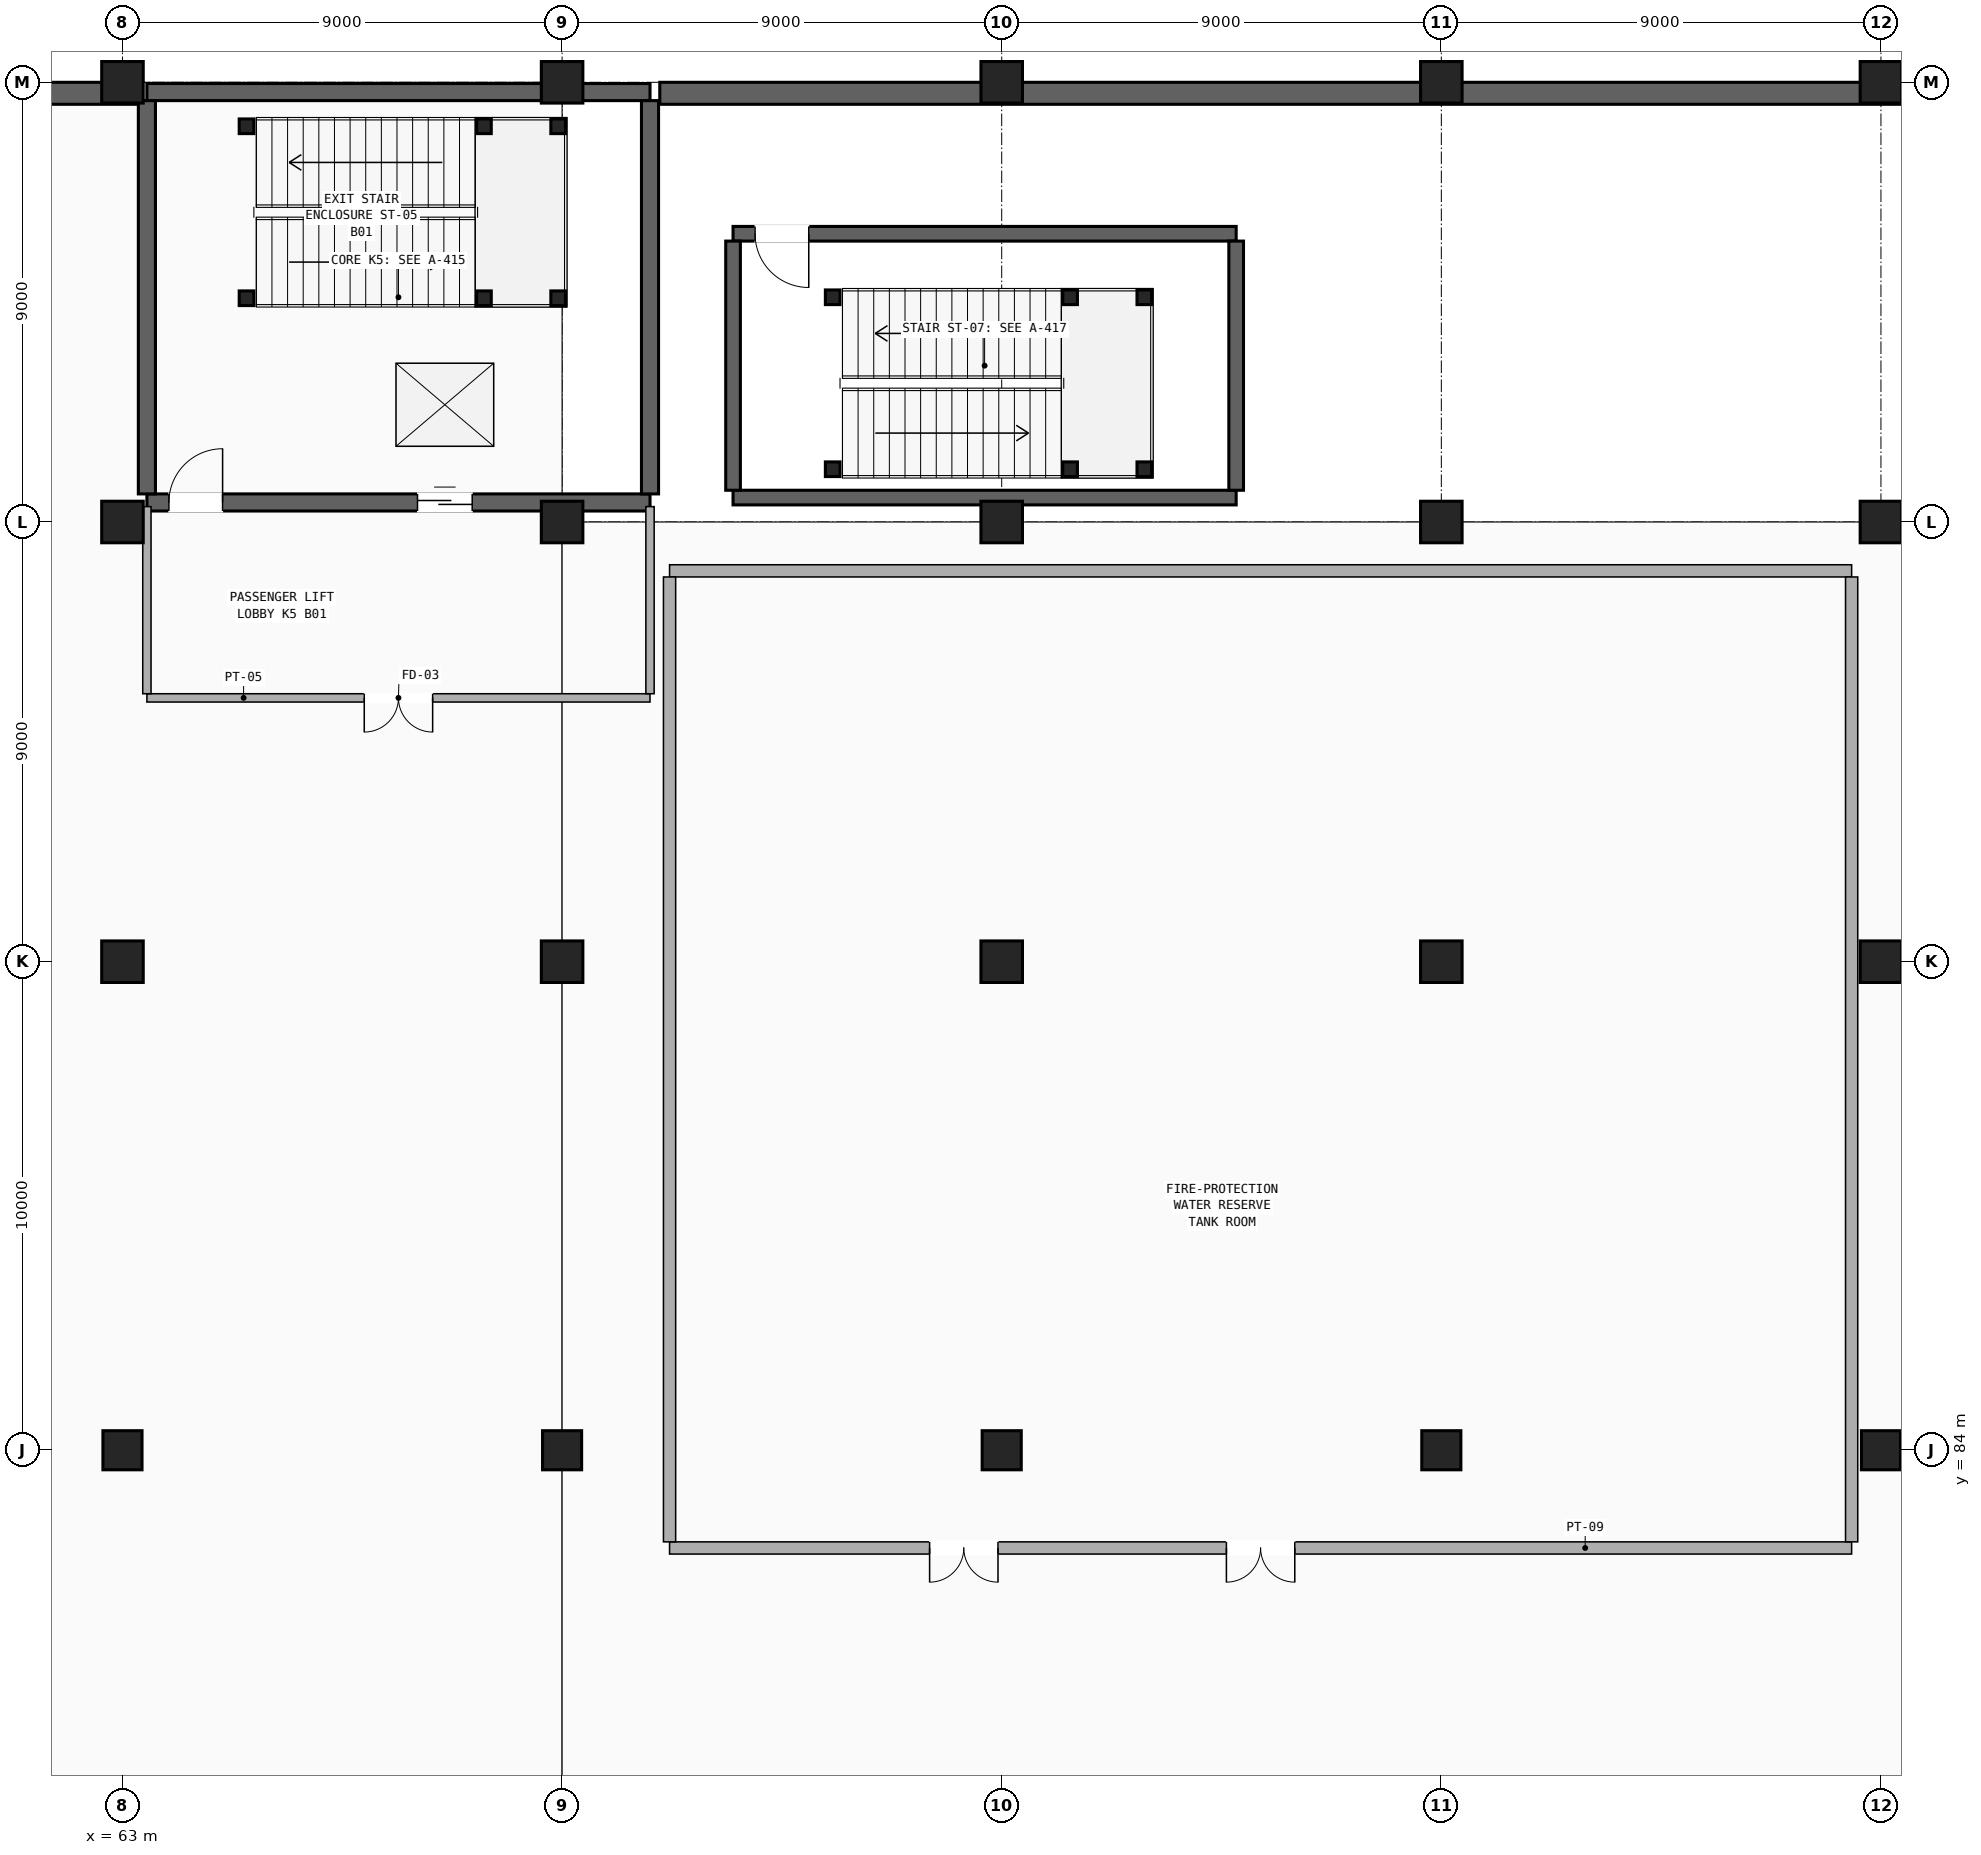
"""IFC4 building model, lengths in metres.
Left out: names, types, materials, properties, quantities, classifications, styles, units other than length and angle.
Written with IfcOpenShell. Run it as: python <this file> out.ifc"""

import sys

from ifc_helpers import new_model, si_unit, direction, frame, frame_2d, origin, origin_2d, place, context, subcontext, project, spatial, rectangle, hollow_rectangle, extrude, element, fill, save


model = new_model("IFC4")
c1 = context("Model", 3, precision=1e-05, world=origin(), true_north=direction((0.0, 1.0)))
c2 = subcontext(c1, "Body", "Model", "MODEL_VIEW")
j1 = project(units=[si_unit("LENGTHUNIT", "METRE"), si_unit("PLANEANGLEUNIT", "RADIAN")], contexts=[c1])
p1 = place(None, origin())
s1 = spatial("IfcSite", under=j1, at=p1, CompositionType="ELEMENT")
p2 = place(p1, origin())
s2 = spatial("IfcBuilding", under=s1, at=p2, CompositionType="ELEMENT")
p3 = place(p2, frame((0.0, 0.0, -5.1)))
s3 = spatial("IfcBuildingStorey", under=s2, at=p3, CompositionType="ELEMENT", Elevation=-5.1)
p4 = place(p3, frame((81.0, 84.0, 0.0), z_axis=(0.0, 0.0, 1.0), x_axis=(1.0, 0.0, 0.0)))
e1 = element("IfcColumn", 1, at=p4, inside=s3, PredefinedType="COLUMN", context=c2, shape_type="SweptSolid", body=[
    extrude(rectangle(XDim=0.8, YDim=0.8, at=origin_2d()), origin(), (0.0, 0.0, 1.0), 5.1),
])
for number, where, z_axis, x_axis in (
    (2, (81.0, 94.0, 0.0), (0.0, 0.0, 1.0), (1.0, 0.0, 0.0)),
    (3, (81.0, 103.0, 0.0), (0.0, 0.0, 1.0), (1.0, 0.0, 0.0)),
    (4, (81.0, 112.0, 0.0), (0.0, 0.0, 1.0), (1.0, 0.0, 0.0)),
):
    element("IfcColumn", number, at=place(p3, frame(where, z_axis=z_axis, x_axis=x_axis)), inside=s3, PredefinedType="COLUMN", context=c2, shape_type="SweptSolid", body=[
        extrude(rectangle(XDim=0.85, YDim=0.85, at=origin_2d()), origin(), (0.0, 0.0, 1.0), 5.1),
    ])
p5 = place(p3, frame((90.0, 84.0, 0.0), z_axis=(0.0, 0.0, 1.0), x_axis=(1.0, 0.0, 0.0)))
e5 = element("IfcColumn", 5, at=p5, inside=s3, PredefinedType="COLUMN", context=c2, shape_type="SweptSolid", body=[
    extrude(rectangle(XDim=0.8, YDim=0.8, at=origin_2d()), origin(), (0.0, 0.0, 1.0), 5.1),
])
for number, where, z_axis, x_axis in (
    (6, (90.0, 94.0, 0.0), (0.0, 0.0, 1.0), (1.0, 0.0, 0.0)),
    (7, (90.0, 103.0, 0.0), (0.0, 0.0, 1.0), (1.0, 0.0, 0.0)),
    (8, (90.0, 112.0, 0.0), (0.0, 0.0, 1.0), (1.0, 0.0, 0.0)),
):
    element("IfcColumn", number, at=place(p3, frame(where, z_axis=z_axis, x_axis=x_axis)), inside=s3, PredefinedType="COLUMN", context=c2, shape_type="SweptSolid", body=[
        extrude(rectangle(XDim=0.85, YDim=0.85, at=origin_2d()), origin(), (0.0, 0.0, 1.0), 5.1),
    ])
p6 = place(p3, frame((99.0, 84.0, 0.0), z_axis=(0.0, 0.0, 1.0), x_axis=(1.0, 0.0, 0.0)))
e9 = element("IfcColumn", 9, at=p6, inside=s3, PredefinedType="COLUMN", context=c2, shape_type="SweptSolid", body=[
    extrude(rectangle(XDim=0.8, YDim=0.8, at=origin_2d()), origin(), (0.0, 0.0, 1.0), 5.1),
])
for number, where, z_axis, x_axis in (
    (10, (99.0, 94.0, 0.0), (0.0, 0.0, 1.0), (1.0, 0.0, 0.0)),
    (11, (99.0, 103.0, 0.0), (0.0, 0.0, 1.0), (1.0, 0.0, 0.0)),
    (12, (99.0, 112.0, 0.0), (0.0, 0.0, 1.0), (1.0, 0.0, 0.0)),
):
    element("IfcColumn", number, at=place(p3, frame(where, z_axis=z_axis, x_axis=x_axis)), inside=s3, PredefinedType="COLUMN", context=c2, shape_type="SweptSolid", body=[
        extrude(rectangle(XDim=0.85, YDim=0.85, at=origin_2d()), origin(), (0.0, 0.0, 1.0), 5.1),
    ])
p7 = place(p3, frame((63.0, 84.0, 0.0), z_axis=(0.0, 0.0, 1.0), x_axis=(1.0, 0.0, 0.0)))
e13 = element("IfcColumn", 13, at=p7, inside=s3, PredefinedType="COLUMN", context=c2, shape_type="SweptSolid", body=[
    extrude(rectangle(XDim=0.8, YDim=0.8, at=origin_2d()), origin(), (0.0, 0.0, 1.0), 5.1),
])
for number, where, z_axis, x_axis in (
    (14, (63.0, 94.0, 0.0), (0.0, 0.0, 1.0), (1.0, 0.0, 0.0)),
    (15, (63.0, 103.0, 0.0), (0.0, 0.0, 1.0), (1.0, 0.0, 0.0)),
    (16, (63.0, 112.0, 0.0), (0.0, 0.0, 1.0), (1.0, 0.0, 0.0)),
):
    element("IfcColumn", number, at=place(p3, frame(where, z_axis=z_axis, x_axis=x_axis)), inside=s3, PredefinedType="COLUMN", context=c2, shape_type="SweptSolid", body=[
        extrude(rectangle(XDim=0.85, YDim=0.85, at=origin_2d()), origin(), (0.0, 0.0, 1.0), 5.1),
    ])
p8 = place(p3, frame((72.0, 84.0, 0.0), z_axis=(0.0, 0.0, 1.0), x_axis=(1.0, 0.0, 0.0)))
e17 = element("IfcColumn", 17, at=p8, inside=s3, PredefinedType="COLUMN", context=c2, shape_type="SweptSolid", body=[
    extrude(rectangle(XDim=0.8, YDim=0.8, at=origin_2d()), origin(), (0.0, 0.0, 1.0), 5.1),
])
for number, where, z_axis, x_axis in (
    (18, (72.0, 94.0, 0.0), (0.0, 0.0, 1.0), (1.0, 0.0, 0.0)),
    (19, (72.0, 103.0, 0.0), (0.0, 0.0, 1.0), (1.0, 0.0, 0.0)),
    (20, (72.0, 112.0, 0.0), (0.0, 0.0, 1.0), (1.0, 0.0, 0.0)),
):
    element("IfcColumn", number, at=place(p3, frame(where, z_axis=z_axis, x_axis=x_axis)), inside=s3, PredefinedType="COLUMN", context=c2, shape_type="SweptSolid", body=[
        extrude(rectangle(XDim=0.85, YDim=0.85, at=origin_2d()), origin(), (0.0, 0.0, 1.0), 5.1),
    ])
p9 = place(p3, frame((0.0, 111.775, 0.0), z_axis=(0.0, 0.0, 1.0), x_axis=(1.0, 0.0, 0.0)))
e21 = element("IfcWall", 21, at=p9, inside=s3, PredefinedType="SOLIDWALL", context=c2, shape_type="SweptSolid", body=[
    extrude(rectangle(XDim=63.3, YDim=0.45, at=frame_2d((31.65, 0.0))), origin(), (0.0, 0.0, 1.0), 5.1),
])
p10 = place(p3, frame((74.0, 111.775, 0.0), z_axis=(0.0, 0.0, 1.0), x_axis=(1.0, 0.0, 0.0)))
e22 = element("IfcWall", 22, at=p10, inside=s3, PredefinedType="SOLIDWALL", context=c2, shape_type="SweptSolid", body=[
    extrude(rectangle(XDim=90.0, YDim=0.45, at=frame_2d((45.0, 0.0))), origin(), (0.0, 0.0, 1.0), 5.1),
])
p11 = place(p3, frame((63.5, 103.4, 0.0), z_axis=(0.0, 0.0, 1.0), x_axis=(1.0, 0.0, 0.0)))
e23 = element("IfcWall", 23, at=p11, inside=s3, PredefinedType="SHEAR", context=c2, shape_type="SweptSolid", body=[
    extrude(rectangle(XDim=10.3, YDim=0.35, at=frame_2d((5.15, 0.0))), origin(), (0.0, 0.0, 1.0), 5.1),
])
p12 = place(p11, frame((0.45, 0.0, 0.0)))
e24 = element("IfcOpeningElement", 24, at=p12, cuts=e23, PredefinedType="OPENING", context=c2, shape_type="SweptSolid", body=[
    extrude(rectangle(XDim=1.1, YDim=2.2, at=frame_2d((0.55, 1.1))), frame((0.0, 0.185, 0.0), z_axis=(0.0, -1.0, 0.0), x_axis=(1.0, 0.0, 0.0)), (0.0, 0.0, 1.0), 0.37),
])
p13 = place(p11, frame((5.54, 0.0, 0.0)))
e25 = element("IfcOpeningElement", 25, at=p13, cuts=e23, PredefinedType="OPENING", context=c2, shape_type="SweptSolid", body=[
    extrude(rectangle(XDim=1.12, YDim=2.16, at=frame_2d((0.56, 1.08))), frame((0.0, 0.185, 0.0), z_axis=(0.0, -1.0, 0.0), x_axis=(1.0, 0.0, 0.0)), (0.0, 0.0, 1.0), 0.37),
])
p14 = place(p3, frame((63.5, 111.8, 0.0), z_axis=(0.0, 0.0, 1.0), x_axis=(1.0, 0.0, 0.0)))
e26 = element("IfcWall", 26, at=p14, inside=s3, PredefinedType="SHEAR", context=c2, shape_type="SweptSolid", body=[
    extrude(rectangle(XDim=10.3, YDim=0.35, at=frame_2d((5.15, 0.0))), origin(), (0.0, 0.0, 1.0), 5.1),
])
for number, where, z_axis, x_axis in (
    (27, (63.5, 103.575, 0.0), (0.0, 0.0, 1.0), (0.0, 1.0, 0.0)),
    (28, (73.8, 103.575, 0.0), (0.0, 0.0, 1.0), (0.0, 1.0, 0.0)),
):
    element("IfcWall", number, at=place(p3, frame(where, z_axis=z_axis, x_axis=x_axis)), inside=s3, PredefinedType="SHEAR", context=c2, shape_type="SweptSolid", body=[
        extrude(rectangle(XDim=8.05, YDim=0.35, at=frame_2d((4.025, 0.0))), origin(), (0.0, 0.0, 1.0), 5.1),
    ])
p15 = place(p3, frame((75.5, 103.5, 0.0), z_axis=(0.0, 0.0, 1.0), x_axis=(1.0, 0.0, 0.0)))
e29 = element("IfcWall", 29, at=p15, inside=s3, PredefinedType="SHEAR", context=c2, shape_type="SweptSolid", body=[
    extrude(rectangle(XDim=10.3, YDim=0.3, at=frame_2d((5.15, 0.0))), origin(), (0.0, 0.0, 1.0), 5.1),
])
p16 = place(p3, frame((75.5, 108.9, 0.0), z_axis=(0.0, 0.0, 1.0), x_axis=(1.0, 0.0, 0.0)))
e30 = element("IfcWall", 30, at=p16, inside=s3, PredefinedType="SHEAR", context=c2, shape_type="SweptSolid", body=[
    extrude(rectangle(XDim=10.3, YDim=0.3, at=frame_2d((5.15, 0.0))), origin(), (0.0, 0.0, 1.0), 5.1),
])
p17 = place(p16, frame((0.45, 0.0, 0.0)))
e31 = element("IfcOpeningElement", 31, at=p17, cuts=e30, PredefinedType="OPENING", context=c2, shape_type="SweptSolid", body=[
    extrude(rectangle(XDim=1.1, YDim=2.2, at=frame_2d((0.55, 1.1))), frame((0.0, 0.16, 0.0), z_axis=(0.0, -1.0, 0.0), x_axis=(1.0, 0.0, 0.0)), (0.0, 0.0, 1.0), 0.32),
])
for number, where, z_axis, x_axis in (
    (32, (75.5, 103.65, 0.0), (0.0, 0.0, 1.0), (0.0, 1.0, 0.0)),
    (33, (85.8, 103.65, 0.0), (0.0, 0.0, 1.0), (0.0, 1.0, 0.0)),
):
    element("IfcWall", number, at=place(p3, frame(where, z_axis=z_axis, x_axis=x_axis)), inside=s3, PredefinedType="SHEAR", context=c2, shape_type="SweptSolid", body=[
        extrude(rectangle(XDim=5.1, YDim=0.3, at=frame_2d((2.55, 0.0))), origin(), (0.0, 0.0, 1.0), 5.1),
    ])
for number, where, z_axis, x_axis in (
    (34, (65.54, 107.58, 0.0), (0.0, 0.0, 1.0), (1.0, 0.0, 0.0)),
    (35, (65.54, 111.1, 0.0), (0.0, 0.0, 1.0), (1.0, 0.0, 0.0)),
    (36, (70.4, 107.58, 0.0), (0.0, 0.0, 1.0), (1.0, 0.0, 0.0)),
    (37, (70.4, 111.1, 0.0), (0.0, 0.0, 1.0), (1.0, 0.0, 0.0)),
    (38, (71.92, 107.58, 0.0), (0.0, 0.0, 1.0), (1.0, 0.0, 0.0)),
    (39, (71.92, 111.1, 0.0), (0.0, 0.0, 1.0), (1.0, 0.0, 0.0)),
    (40, (77.54, 104.08, 0.0), (0.0, 0.0, 1.0), (1.0, 0.0, 0.0)),
    (41, (77.54, 107.6, 0.0), (0.0, 0.0, 1.0), (1.0, 0.0, 0.0)),
    (42, (82.4, 104.08, 0.0), (0.0, 0.0, 1.0), (1.0, 0.0, 0.0)),
    (43, (82.4, 107.6, 0.0), (0.0, 0.0, 1.0), (1.0, 0.0, 0.0)),
    (44, (83.92, 104.08, 0.0), (0.0, 0.0, 1.0), (1.0, 0.0, 0.0)),
    (45, (83.92, 107.6, 0.0), (0.0, 0.0, 1.0), (1.0, 0.0, 0.0)),
):
    element("IfcColumn", number, at=place(p3, frame(where, z_axis=z_axis, x_axis=x_axis)), inside=s3, PredefinedType="COLUMN", context=c2, shape_type="SweptSolid", body=[
        extrude(hollow_rectangle(XDim=0.3, YDim=0.3, WallThickness=0.016, InnerFilletRadius=0.016, OuterFilletRadius=0.032, at=origin_2d()), origin(), (0.0, 0.0, 1.0), 5.1),
    ])
p18 = place(p3, frame((63.5, 99.4, 0.0), z_axis=(0.0, 0.0, 1.0), x_axis=(1.0, 0.0, 0.0)))
e46 = element("IfcWall", 46, at=p18, inside=s3, PredefinedType="PARTITIONING", context=c2, shape_type="SweptSolid", body=[
    extrude(rectangle(XDim=10.3, YDim=0.17, at=frame_2d((5.15, 0.0))), origin(), (0.0, 0.0, 1.0), 3.95),
])
p19 = place(p18, frame((4.45, 0.0, 0.0)))
e47 = element("IfcOpeningElement", 47, at=p19, cuts=e46, PredefinedType="OPENING", context=c2, shape_type="SweptSolid", body=[
    extrude(rectangle(XDim=1.4, YDim=2.2, at=frame_2d((0.7, 1.1))), frame((0.0, 0.095, 0.0), z_axis=(0.0, -1.0, 0.0), x_axis=(1.0, 0.0, 0.0)), (0.0, 0.0, 1.0), 0.19),
])
p20 = place(p3, frame((63.5, 99.485, 0.0), z_axis=(0.0, 0.0, 1.0), x_axis=(0.0, 1.0, 0.0)))
e48 = element("IfcWall", 48, at=p20, inside=s3, PredefinedType="PARTITIONING", context=c2, shape_type="SweptSolid", body=[
    extrude(rectangle(XDim=3.83, YDim=0.17, at=frame_2d((1.915, 0.0))), origin(), (0.0, 0.0, 1.0), 3.95),
])
p21 = place(p3, frame((73.8, 99.485, 0.0), z_axis=(0.0, 0.0, 1.0), x_axis=(0.0, 1.0, 0.0)))
e49 = element("IfcWall", 49, at=p21, inside=s3, PredefinedType="PARTITIONING", context=c2, shape_type="SweptSolid", body=[
    extrude(rectangle(XDim=3.83, YDim=0.17, at=frame_2d((1.915, 0.0))), origin(), (0.0, 0.0, 1.0), 4.05),
])
p22 = place(p3, frame((74.2, 82.0, 0.0), z_axis=(0.0, 0.0, 1.0), x_axis=(1.0, 0.0, 0.0)))
e50 = element("IfcWall", 50, at=p22, inside=s3, PredefinedType="PARTITIONING", context=c2, shape_type="SweptSolid", body=[
    extrude(rectangle(XDim=24.2, YDim=0.25, at=frame_2d((12.1, 0.0))), origin(), (0.0, 0.0, 1.0), 3.95),
])
p23 = place(p22, frame((11.4, 0.0, 0.0)))
e51 = element("IfcOpeningElement", 51, at=p23, cuts=e50, PredefinedType="OPENING", context=c2, shape_type="SweptSolid", body=[
    extrude(rectangle(XDim=1.4, YDim=2.2, at=frame_2d((0.7, 1.1))), frame((0.0, 0.135, 0.0), z_axis=(0.0, -1.0, 0.0), x_axis=(1.0, 0.0, 0.0)), (0.0, 0.0, 1.0), 0.27),
])
p24 = place(p22, frame((5.324, 0.0, 0.0)))
e52 = element("IfcOpeningElement", 52, at=p24, cuts=e50, PredefinedType="OPENING", context=c2, shape_type="SweptSolid", body=[
    extrude(rectangle(XDim=1.4, YDim=2.2, at=frame_2d((0.7, 1.1))), frame((0.0, 0.135, 0.0), z_axis=(0.0, -1.0, 0.0), x_axis=(1.0, 0.0, 0.0)), (0.0, 0.0, 1.0), 0.27),
])
p25 = place(p3, frame((74.2, 102.0, 0.0), z_axis=(0.0, 0.0, 1.0), x_axis=(1.0, 0.0, 0.0)))
e53 = element("IfcWall", 53, at=p25, inside=s3, PredefinedType="PARTITIONING", context=c2, shape_type="SweptSolid", body=[
    extrude(rectangle(XDim=24.2, YDim=0.25, at=frame_2d((12.1, 0.0))), origin(), (0.0, 0.0, 1.0), 4.12),
])
for number, where, z_axis, x_axis in (
    (54, (74.2, 82.125, 0.0), (0.0, 0.0, 1.0), (0.0, 1.0, 0.0)),
    (55, (98.4, 82.125, 0.0), (0.0, 0.0, 1.0), (0.0, 1.0, 0.0)),
):
    element("IfcWall", number, at=place(p3, frame(where, z_axis=z_axis, x_axis=x_axis)), inside=s3, PredefinedType="PARTITIONING", context=c2, shape_type="SweptSolid", body=[
        extrude(rectangle(XDim=19.75, YDim=0.25, at=frame_2d((9.875, 0.0))), origin(), (0.0, 0.0, 1.0), 3.9),
    ])
p26 = place(p12, origin())
e56 = element("IfcDoor", 56, at=p26, inside=s3, OperationType="SINGLE_SWING_RIGHT", PredefinedType="DOOR", context=c2, shape_type="SweptSolid", body=[
    extrude(rectangle(XDim=1.1, YDim=2.2, at=frame_2d((0.55, 1.1))), frame((0.0, 0.025, 0.0), z_axis=(0.0, -1.0, 0.0), x_axis=(1.0, 0.0, 0.0)), (0.0, 0.0, 1.0), 0.05),
])
fill(e24, e56)
p27 = place(p17, frame((1.1, 0.0, 0.0), z_axis=(0.0, 0.0, 1.0), x_axis=(-1.0, 0.0, 0.0)))
e57 = element("IfcDoor", 57, at=p27, inside=s3, OperationType="SINGLE_SWING_LEFT", PredefinedType="DOOR", context=c2, shape_type="SweptSolid", body=[
    extrude(rectangle(XDim=1.1, YDim=2.2, at=frame_2d((0.55, 1.1))), frame((0.0, 0.025, 0.0), z_axis=(0.0, -1.0, 0.0), x_axis=(1.0, 0.0, 0.0)), (0.0, 0.0, 1.0), 0.05),
])
fill(e31, e57)
p28 = place(p13, origin())
e58 = element("IfcDoor", 58, at=p28, inside=s3, OperationType="SLIDING_TO_LEFT", PredefinedType="DOOR", context=c2, shape_type="SweptSolid", body=[
    extrude(rectangle(XDim=1.12, YDim=2.16, at=frame_2d((0.56, 1.08))), frame((0.0, 0.025, 0.0), z_axis=(0.0, -1.0, 0.0), x_axis=(1.0, 0.0, 0.0)), (0.0, 0.0, 1.0), 0.05),
])
fill(e25, e58)
p29 = place(p19, frame((1.4, 0.0, 0.0), z_axis=(0.0, 0.0, 1.0), x_axis=(-1.0, 0.0, 0.0)))
e59 = element("IfcDoor", 59, at=p29, inside=s3, OperationType="DOUBLE_DOOR_SINGLE_SWING", PredefinedType="DOOR", context=c2, shape_type="SweptSolid", body=[
    extrude(rectangle(XDim=1.4, YDim=2.2, at=frame_2d((0.7, 1.1))), frame((0.0, 0.025, 0.0), z_axis=(0.0, -1.0, 0.0), x_axis=(1.0, 0.0, 0.0)), (0.0, 0.0, 1.0), 0.05),
])
fill(e47, e59)
p30 = place(p23, frame((1.4, 0.0, 0.0), z_axis=(0.0, 0.0, 1.0), x_axis=(-1.0, 0.0, 0.0)))
e60 = element("IfcDoor", 60, at=p30, inside=s3, OperationType="DOUBLE_DOOR_SINGLE_SWING", PredefinedType="DOOR", context=c2, shape_type="SweptSolid", body=[
    extrude(rectangle(XDim=1.4, YDim=2.2, at=frame_2d((0.7, 1.1))), frame((0.0, 0.025, 0.0), z_axis=(0.0, -1.0, 0.0), x_axis=(1.0, 0.0, 0.0)), (0.0, 0.0, 1.0), 0.05),
])
fill(e51, e60)
p31 = place(p24, frame((1.4, 0.0, 0.0), z_axis=(0.0, 0.0, 1.0), x_axis=(-1.0, 0.0, 0.0)))
e61 = element("IfcDoor", 61, at=p31, inside=s3, OperationType="DOUBLE_DOOR_SINGLE_SWING", PredefinedType="DOOR", context=c2, shape_type="SweptSolid", body=[
    extrude(rectangle(XDim=1.4, YDim=2.2, at=frame_2d((0.7, 1.1))), frame((0.0, 0.025, 0.0), z_axis=(0.0, -1.0, 0.0), x_axis=(1.0, 0.0, 0.0)), (0.0, 0.0, 1.0), 0.05),
])
fill(e52, e61)
save(model, sys.argv[1])
